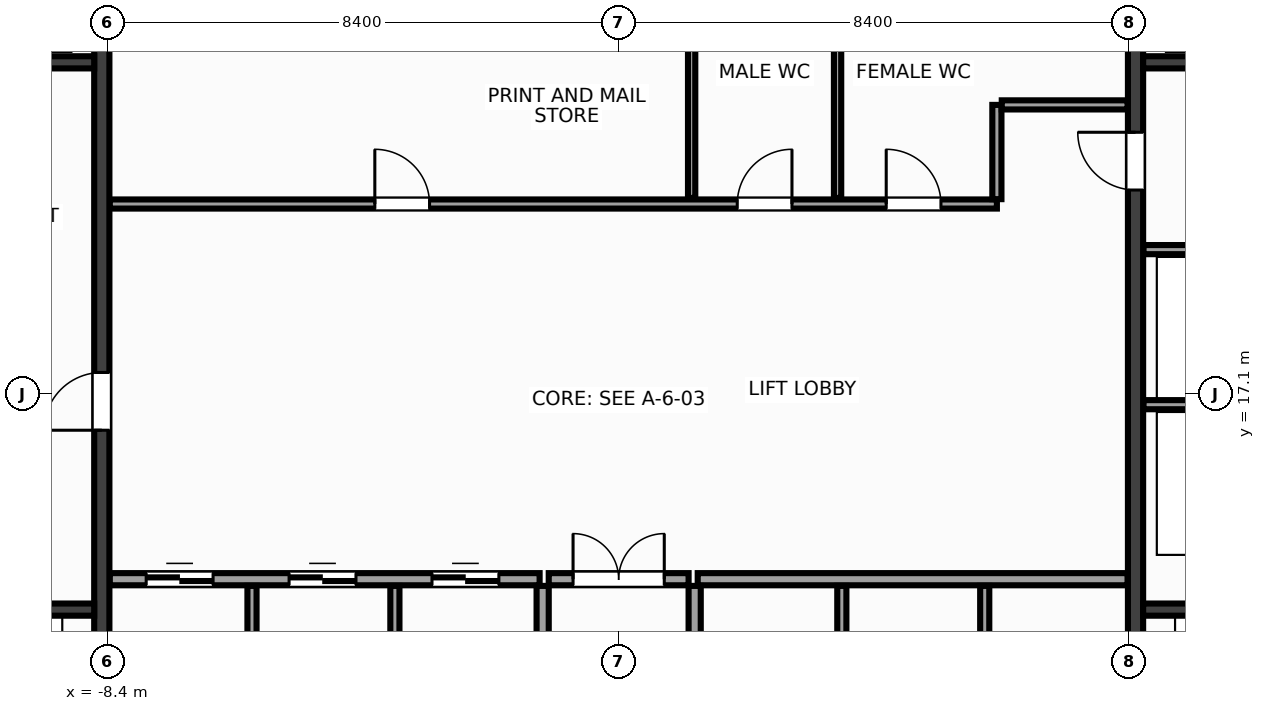
"""IFC4 building model, lengths in metres.
Left out: names, types, materials, properties, quantities, classifications, styles, units other than length and angle.
Written with IfcOpenShell. Run it as: python <this file> out.ifc"""

import sys

from ifc_helpers import new_model, si_unit, direction, frame, frame_2d, origin, place, context, subcontext, project, spatial, rectangle, extrude, source, transform, mapped, element, fill, save


model = new_model("IFC4")
c1 = context("Model", 3, precision=1e-05, world=origin(), true_north=direction((0.0, 1.0)))
c2 = subcontext(c1, "Body", "Model", "MODEL_VIEW")
j1 = project(units=[si_unit("LENGTHUNIT", "METRE"), si_unit("PLANEANGLEUNIT", "RADIAN")], contexts=[c1])
p1 = place(None, origin())
s1 = spatial("IfcSite", under=j1, at=p1, CompositionType="ELEMENT")
p2 = place(p1, origin())
s2 = spatial("IfcBuilding", under=s1, at=p2, CompositionType="ELEMENT")
p3 = place(p2, frame((0.0, 0.0, 52.4)))
s3 = spatial("IfcBuildingStorey", under=s2, at=p3, CompositionType="ELEMENT", Elevation=52.4)
m1 = source(origin(), c2, "Body", "SweptSolid", [
    extrude(rectangle(XDim=12.8, YDim=0.25, at=frame_2d((6.4, 0.0))), origin(), (0.0, 0.0, 1.0), 3.6),
])
p4 = place(p3, frame((-8.5, 10.6, 0.0), z_axis=(0.0, 0.0, 1.0), x_axis=(0.0, 1.0, 0.0)))
e1 = element("IfcWall", 1, at=p4, inside=s3, PredefinedType="SHEAR", context=c2, shape_type="MappedRepresentation", body=[
    mapped(m1, transform((0.0, 0.0, 0.0), x_axis=(1.0, 0.0, 0.0), y_axis=(0.0, 1.0, 0.0), z_axis=(0.0, 0.0, 1.0), scale=1.0)),
])
p5 = place(p4, frame((5.9, 0.0, 0.0)))
e2 = element("IfcOpeningElement", 2, at=p5, cuts=e1, PredefinedType="OPENING", context=c2, shape_type="SweptSolid", body=[
    extrude(rectangle(XDim=0.95, YDim=2.15, at=frame_2d((0.475, 1.075))), frame((0.0, 0.137, 0.0), z_axis=(0.0, -1.0, 0.0), x_axis=(1.0, 0.0, 0.0)), (0.0, 0.0, 1.0), 0.274),
])
p6 = place(p3, frame((8.5, 10.6, 0.0), z_axis=(0.0, 0.0, 1.0), x_axis=(0.0, 1.0, 0.0)))
e3 = element("IfcWall", 3, at=p6, inside=s3, PredefinedType="SHEAR", context=c2, shape_type="MappedRepresentation", body=[
    mapped(m1, transform((0.0, 0.0, 0.0), x_axis=(1.0, 0.0, 0.0), y_axis=(0.0, 1.0, 0.0), z_axis=(0.0, 0.0, 1.0), scale=1.0)),
])
p7 = place(p6, frame((9.85, 0.0, 0.0)))
e4 = element("IfcOpeningElement", 4, at=p7, cuts=e3, PredefinedType="OPENING", context=c2, shape_type="SweptSolid", body=[
    extrude(rectangle(XDim=0.95, YDim=2.15, at=frame_2d((0.475, 1.075))), frame((0.0, 0.137, 0.0), z_axis=(0.0, -1.0, 0.0), x_axis=(1.0, 0.0, 0.0)), (0.0, 0.0, 1.0), 0.274),
])
m2 = source(origin(), c2, "Body", "SweptSolid", [
    extrude(rectangle(XDim=2.825, YDim=0.2, at=frame_2d((1.413, 0.0))), origin(), (0.0, 0.0, 1.0), 3.6),
])
for number, where, z_axis, x_axis in (
    (5, (-11.45, 13.55, 0.0), (0.0, 0.0, 1.0), (1.0, 0.0, 0.0)),
    (6, (8.625, 13.55, 0.0), (0.0, 0.0, 1.0), (1.0, 0.0, 0.0)),
):
    element("IfcWall", number, at=place(p3, frame(where, z_axis=z_axis, x_axis=x_axis)), inside=s3, PredefinedType="SHEAR", context=c2, shape_type="MappedRepresentation", body=[
        mapped(m2, transform((0.0, 0.0, 0.0), x_axis=(1.0, 0.0, 0.0), y_axis=(0.0, 1.0, 0.0), z_axis=(0.0, 0.0, 1.0), scale=1.0)),
    ])
m3 = source(origin(), c2, "Body", "SweptSolid", [
    extrude(rectangle(XDim=3.02, YDim=0.2, at=frame_2d((1.51, 0.0))), origin(), (0.0, 0.0, 1.0), 3.6),
])
for number, where, z_axis, x_axis in (
    (7, (-11.645, 22.55, 0.0), (0.0, 0.0, 1.0), (1.0, 0.0, 0.0)),
    (8, (8.625, 22.55, 0.0), (0.0, 0.0, 1.0), (1.0, 0.0, 0.0)),
):
    element("IfcWall", number, at=place(p3, frame(where, z_axis=z_axis, x_axis=x_axis)), inside=s3, PredefinedType="SHEAR", context=c2, shape_type="MappedRepresentation", body=[
        mapped(m3, transform((0.0, 0.0, 0.0), x_axis=(1.0, 0.0, 0.0), y_axis=(0.0, 1.0, 0.0), z_axis=(0.0, 0.0, 1.0), scale=1.0)),
    ])
m4 = source(origin(), c2, "Body", "SweptSolid", [
    extrude(rectangle(XDim=3.01, YDim=0.15, at=frame_2d((1.505, 0.0))), origin(), (0.0, 0.0, 1.0), 3.36),
])
for number, where, z_axis, x_axis in (
    (9, (8.63, 16.92, 0.0), (0.0, 0.0, 1.0), (1.0, 0.0, 0.0)),
    (10, (8.63, 19.47, 0.0), (0.0, 0.0, 1.0), (1.0, 0.0, 0.0)),
):
    element("IfcWall", number, at=place(p3, frame(where, z_axis=z_axis, x_axis=x_axis)), inside=s3, PredefinedType="PARTITIONING", context=c2, shape_type="MappedRepresentation", body=[
        mapped(m4, transform((0.0, 0.0, 0.0), x_axis=(1.0, 0.0, 0.0), y_axis=(0.0, 1.0, 0.0), z_axis=(0.0, 0.0, 1.0), scale=1.0)),
    ])
m5 = source(origin(), c2, "Body", "SweptSolid", [
    extrude(rectangle(XDim=7.07, YDim=0.2, at=frame_2d((3.535, 0.0))), origin(), (0.0, 0.0, 1.0), 3.36),
])
p8 = place(p3, frame((-8.37, 14.05, 0.0), z_axis=(0.0, 0.0, 1.0), x_axis=(1.0, 0.0, 0.0)))
e11 = element("IfcWall", 11, at=p8, inside=s3, PredefinedType="PARTITIONING", context=c2, shape_type="MappedRepresentation", body=[
    mapped(m5, transform((0.0, 0.0, 0.0), x_axis=(1.0, 0.0, 0.0), y_axis=(0.0, 1.0, 0.0), z_axis=(0.0, 0.0, 1.0), scale=1.0)),
])
p9 = place(p8, frame((0.6, 0.0, 0.0)))
e12 = element("IfcOpeningElement", 12, at=p9, cuts=e11, PredefinedType="OPENING", context=c2, shape_type="SweptSolid", body=[
    extrude(rectangle(XDim=1.1, YDim=2.15, at=frame_2d((0.55, 1.075))), frame((0.0, 0.112, 0.0), z_axis=(0.0, -1.0, 0.0), x_axis=(1.0, 0.0, 0.0)), (0.0, 0.0, 1.0), 0.224),
])
p10 = place(p8, frame((2.95, 0.0, 0.0)))
e13 = element("IfcOpeningElement", 13, at=p10, cuts=e11, PredefinedType="OPENING", context=c2, shape_type="SweptSolid", body=[
    extrude(rectangle(XDim=1.1, YDim=2.15, at=frame_2d((0.55, 1.075))), frame((0.0, 0.112, 0.0), z_axis=(0.0, -1.0, 0.0), x_axis=(1.0, 0.0, 0.0)), (0.0, 0.0, 1.0), 0.224),
])
p11 = place(p8, frame((5.3, 0.0, 0.0)))
e14 = element("IfcOpeningElement", 14, at=p11, cuts=e11, PredefinedType="OPENING", context=c2, shape_type="SweptSolid", body=[
    extrude(rectangle(XDim=1.1, YDim=2.15, at=frame_2d((0.55, 1.075))), frame((0.0, 0.112, 0.0), z_axis=(0.0, -1.0, 0.0), x_axis=(1.0, 0.0, 0.0)), (0.0, 0.0, 1.0), 0.224),
])
p12 = place(p3, frame((1.3, 14.05, 0.0), z_axis=(0.0, 0.0, 1.0), x_axis=(1.0, 0.0, 0.0)))
e15 = element("IfcWall", 15, at=p12, inside=s3, PredefinedType="PARTITIONING", context=c2, shape_type="MappedRepresentation", body=[
    mapped(m5, transform((0.0, 0.0, 0.0), x_axis=(1.0, 0.0, 0.0), y_axis=(0.0, 1.0, 0.0), z_axis=(0.0, 0.0, 1.0), scale=1.0)),
])
m6 = source(origin(), c2, "Body", "SweptSolid", [
    extrude(rectangle(XDim=3.34, YDim=0.2, at=frame_2d((1.67, 0.0))), origin(), (0.0, 0.0, 1.0), 3.36),
])
for number, where, z_axis, x_axis in (
    (16, (-1.25, 10.6, 0.0), (0.0, 0.0, 1.0), (0.0, 1.0, 0.0)),
    (17, (1.25, 10.6, 0.0), (0.0, 0.0, 1.0), (0.0, 1.0, 0.0)),
):
    element("IfcWall", number, at=place(p3, frame(where, z_axis=z_axis, x_axis=x_axis)), inside=s3, PredefinedType="PARTITIONING", context=c2, shape_type="MappedRepresentation", body=[
        mapped(m6, transform((0.0, 0.0, 0.0), x_axis=(1.0, 0.0, 0.0), y_axis=(0.0, 1.0, 0.0), z_axis=(0.0, 0.0, 1.0), scale=1.0)),
    ])
m7 = source(origin(), c2, "Body", "SweptSolid", [
    extrude(rectangle(XDim=2.3, YDim=0.2, at=frame_2d((1.15, 0.0))), origin(), (0.0, 0.0, 1.0), 3.36),
])
p13 = place(p3, frame((-1.15, 14.05, 0.0), z_axis=(0.0, 0.0, 1.0), x_axis=(1.0, 0.0, 0.0)))
e18 = element("IfcWall", 18, at=p13, inside=s3, PredefinedType="PARTITIONING", context=c2, shape_type="MappedRepresentation", body=[
    mapped(m7, transform((0.0, 0.0, 0.0), x_axis=(1.0, 0.0, 0.0), y_axis=(0.0, 1.0, 0.0), z_axis=(0.0, 0.0, 1.0), scale=1.0)),
])
p14 = place(p13, frame((0.4, 0.0, 0.0)))
e19 = element("IfcOpeningElement", 19, at=p14, cuts=e18, PredefinedType="OPENING", context=c2, shape_type="SweptSolid", body=[
    extrude(rectangle(XDim=1.5, YDim=2.2, at=frame_2d((0.75, 1.1))), frame((0.0, 0.112, 0.0), z_axis=(0.0, -1.0, 0.0), x_axis=(1.0, 0.0, 0.0)), (0.0, 0.0, 1.0), 0.224),
])
m8 = source(origin(), c2, "Body", "SweptSolid", [
    extrude(rectangle(XDim=14.59, YDim=0.15, at=frame_2d((7.295, 0.0))), origin(), (0.0, 0.0, 1.0), 3.36),
])
p15 = place(p3, frame((-8.37, 20.22, 0.0), z_axis=(0.0, 0.0, 1.0), x_axis=(1.0, 0.0, 0.0)))
e20 = element("IfcWall", 20, at=p15, inside=s3, PredefinedType="PARTITIONING", context=c2, shape_type="MappedRepresentation", body=[
    mapped(m8, transform((0.0, 0.0, 0.0), x_axis=(1.0, 0.0, 0.0), y_axis=(0.0, 1.0, 0.0), z_axis=(0.0, 0.0, 1.0), scale=1.0)),
])
p16 = place(p15, frame((4.36, 0.0, 0.0)))
e21 = element("IfcOpeningElement", 21, at=p16, cuts=e20, PredefinedType="OPENING", context=c2, shape_type="SweptSolid", body=[
    extrude(rectangle(XDim=0.9, YDim=2.15, at=frame_2d((0.45, 1.075))), frame((0.0, 0.087, 0.0), z_axis=(0.0, -1.0, 0.0), x_axis=(1.0, 0.0, 0.0)), (0.0, 0.0, 1.0), 0.174),
])
p17 = place(p15, frame((10.32, 0.0, 0.0)))
e22 = element("IfcOpeningElement", 22, at=p17, cuts=e20, PredefinedType="OPENING", context=c2, shape_type="SweptSolid", body=[
    extrude(rectangle(XDim=0.9, YDim=2.15, at=frame_2d((0.45, 1.075))), frame((0.0, 0.087, 0.0), z_axis=(0.0, -1.0, 0.0), x_axis=(1.0, 0.0, 0.0)), (0.0, 0.0, 1.0), 0.174),
])
p18 = place(p15, frame((12.77, 0.0, 0.0)))
e23 = element("IfcOpeningElement", 23, at=p18, cuts=e20, PredefinedType="OPENING", context=c2, shape_type="SweptSolid", body=[
    extrude(rectangle(XDim=0.9, YDim=2.15, at=frame_2d((0.45, 1.075))), frame((0.0, 0.087, 0.0), z_axis=(0.0, -1.0, 0.0), x_axis=(1.0, 0.0, 0.0)), (0.0, 0.0, 1.0), 0.174),
])
m9 = source(origin(), c2, "Body", "SweptSolid", [
    extrude(rectangle(XDim=1.55, YDim=0.15, at=frame_2d((0.775, 0.0))), origin(), (0.0, 0.0, 1.0), 3.36),
])
p19 = place(p3, frame((6.22, 20.3, 0.0), z_axis=(0.0, 0.0, 1.0), x_axis=(0.0, 1.0, 0.0)))
e24 = element("IfcWall", 24, at=p19, inside=s3, PredefinedType="PARTITIONING", context=c2, shape_type="MappedRepresentation", body=[
    mapped(m9, transform((0.0, 0.0, 0.0), x_axis=(1.0, 0.0, 0.0), y_axis=(0.0, 1.0, 0.0), z_axis=(0.0, 0.0, 1.0), scale=1.0)),
])
m10 = source(origin(), c2, "Body", "SweptSolid", [
    extrude(rectangle(XDim=2.07, YDim=0.15, at=frame_2d((1.035, 0.0))), origin(), (0.0, 0.0, 1.0), 3.36),
])
p20 = place(p3, frame((6.3, 21.85, 0.0), z_axis=(0.0, 0.0, 1.0), x_axis=(1.0, 0.0, 0.0)))
e25 = element("IfcWall", 25, at=p20, inside=s3, PredefinedType="PARTITIONING", context=c2, shape_type="MappedRepresentation", body=[
    mapped(m10, transform((0.0, 0.0, 0.0), x_axis=(1.0, 0.0, 0.0), y_axis=(0.0, 1.0, 0.0), z_axis=(0.0, 0.0, 1.0), scale=1.0)),
])
m11 = source(origin(), c2, "Body", "SweptSolid", [
    extrude(rectangle(XDim=3.34, YDim=0.15, at=frame_2d((1.67, 0.0))), origin(), (0.0, 0.0, 1.0), 3.36),
])
for number, where, z_axis, x_axis in (
    (26, (-6.03, 10.6, 0.0), (0.0, 0.0, 1.0), (0.0, 1.0, 0.0)),
    (27, (-3.68, 10.6, 0.0), (0.0, 0.0, 1.0), (0.0, 1.0, 0.0)),
    (28, (3.67, 10.6, 0.0), (0.0, 0.0, 1.0), (0.0, 1.0, 0.0)),
    (29, (6.02, 10.6, 0.0), (0.0, 0.0, 1.0), (0.0, 1.0, 0.0)),
):
    element("IfcWall", number, at=place(p3, frame(where, z_axis=z_axis, x_axis=x_axis)), inside=s3, PredefinedType="PARTITIONING", context=c2, shape_type="MappedRepresentation", body=[
        mapped(m11, transform((0.0, 0.0, 0.0), x_axis=(1.0, 0.0, 0.0), y_axis=(0.0, 1.0, 0.0), z_axis=(0.0, 0.0, 1.0), scale=1.0)),
    ])
m12 = source(origin(), c2, "Body", "SweptSolid", [
    extrude(rectangle(XDim=3.04, YDim=0.12, at=frame_2d((1.52, 0.0))), origin(), (0.0, 0.0, 1.0), 3.36),
])
for number, where, z_axis, x_axis in (
    (30, (1.2, 20.32, 0.0), (0.0, 0.0, 1.0), (0.0, 1.0, 0.0)),
    (31, (3.6, 20.32, 0.0), (0.0, 0.0, 1.0), (0.0, 1.0, 0.0)),
):
    element("IfcWall", number, at=place(p3, frame(where, z_axis=z_axis, x_axis=x_axis)), inside=s3, PredefinedType="PARTITIONING", context=c2, shape_type="MappedRepresentation", body=[
        mapped(m12, transform((0.0, 0.0, 0.0), x_axis=(1.0, 0.0, 0.0), y_axis=(0.0, 1.0, 0.0), z_axis=(0.0, 0.0, 1.0), scale=1.0)),
    ])
m13 = source(origin(), c2, "Body", "SweptSolid", [
    extrude(rectangle(XDim=0.95, YDim=2.15, at=frame_2d((0.475, 1.075))), frame((0.0, 0.025, 0.0), z_axis=(0.0, -1.0, 0.0), x_axis=(1.0, 0.0, 0.0)), (0.0, 0.0, 1.0), 0.05),
])
p21 = place(p5, origin())
e32 = element("IfcDoor", 32, at=p21, inside=s3, OperationType="SINGLE_SWING_LEFT", PredefinedType="DOOR", context=c2, shape_type="MappedRepresentation", body=[
    mapped(m13, transform((0.0, 0.0, 0.0), x_axis=(1.0, 0.0, 0.0), y_axis=(0.0, 1.0, 0.0), z_axis=(0.0, 0.0, 1.0), scale=1.0)),
])
fill(e2, e32)
m14 = source(origin(), c2, "Body", "SweptSolid", [
    extrude(rectangle(XDim=0.95, YDim=2.15, at=frame_2d((0.475, 1.075))), frame((0.0, 0.025, 0.0), z_axis=(0.0, -1.0, 0.0), x_axis=(1.0, 0.0, 0.0)), (0.0, 0.0, 1.0), 0.05),
])
p22 = place(p7, origin())
e33 = element("IfcDoor", 33, at=p22, inside=s3, OperationType="SINGLE_SWING_RIGHT", PredefinedType="DOOR", context=c2, shape_type="MappedRepresentation", body=[
    mapped(m14, transform((0.0, 0.0, 0.0), x_axis=(1.0, 0.0, 0.0), y_axis=(0.0, 1.0, 0.0), z_axis=(0.0, 0.0, 1.0), scale=1.0)),
])
fill(e4, e33)
m15 = source(origin(), c2, "Body", "SweptSolid", [
    extrude(rectangle(XDim=1.1, YDim=2.15, at=frame_2d((0.55, 1.075))), frame((0.0, 0.025, 0.0), z_axis=(0.0, -1.0, 0.0), x_axis=(1.0, 0.0, 0.0)), (0.0, 0.0, 1.0), 0.05),
])
p23 = place(p9, origin())
e34 = element("IfcDoor", 34, at=p23, inside=s3, OperationType="DOUBLE_DOOR_SLIDING", PredefinedType="DOOR", context=c2, shape_type="MappedRepresentation", body=[
    mapped(m15, transform((0.0, 0.0, 0.0), x_axis=(1.0, 0.0, 0.0), y_axis=(0.0, 1.0, 0.0), z_axis=(0.0, 0.0, 1.0), scale=1.0)),
])
fill(e12, e34)
p24 = place(p10, origin())
e35 = element("IfcDoor", 35, at=p24, inside=s3, OperationType="DOUBLE_DOOR_SLIDING", PredefinedType="DOOR", context=c2, shape_type="MappedRepresentation", body=[
    mapped(m15, transform((0.0, 0.0, 0.0), x_axis=(1.0, 0.0, 0.0), y_axis=(0.0, 1.0, 0.0), z_axis=(0.0, 0.0, 1.0), scale=1.0)),
])
fill(e13, e35)
p25 = place(p11, origin())
e36 = element("IfcDoor", 36, at=p25, inside=s3, OperationType="DOUBLE_DOOR_SLIDING", PredefinedType="DOOR", context=c2, shape_type="MappedRepresentation", body=[
    mapped(m15, transform((0.0, 0.0, 0.0), x_axis=(1.0, 0.0, 0.0), y_axis=(0.0, 1.0, 0.0), z_axis=(0.0, 0.0, 1.0), scale=1.0)),
])
fill(e14, e36)
m16 = source(origin(), c2, "Body", "SweptSolid", [
    extrude(rectangle(XDim=1.5, YDim=2.2, at=frame_2d((0.75, 1.1))), frame((0.0, 0.025, 0.0), z_axis=(0.0, -1.0, 0.0), x_axis=(1.0, 0.0, 0.0)), (0.0, 0.0, 1.0), 0.05),
])
p26 = place(p14, origin())
e37 = element("IfcDoor", 37, at=p26, inside=s3, OperationType="DOUBLE_DOOR_SINGLE_SWING", PredefinedType="DOOR", context=c2, shape_type="MappedRepresentation", body=[
    mapped(m16, transform((0.0, 0.0, 0.0), x_axis=(1.0, 0.0, 0.0), y_axis=(0.0, 1.0, 0.0), z_axis=(0.0, 0.0, 1.0), scale=1.0)),
])
fill(e19, e37)
m17 = source(origin(), c2, "Body", "SweptSolid", [
    extrude(rectangle(XDim=0.9, YDim=2.15, at=frame_2d((0.45, 1.075))), frame((0.0, 0.025, 0.0), z_axis=(0.0, -1.0, 0.0), x_axis=(1.0, 0.0, 0.0)), (0.0, 0.0, 1.0), 0.05),
])
p27 = place(p16, origin())
e38 = element("IfcDoor", 38, at=p27, inside=s3, OperationType="SINGLE_SWING_LEFT", PredefinedType="DOOR", context=c2, shape_type="MappedRepresentation", body=[
    mapped(m17, transform((0.0, 0.0, 0.0), x_axis=(1.0, 0.0, 0.0), y_axis=(0.0, 1.0, 0.0), z_axis=(0.0, 0.0, 1.0), scale=1.0)),
])
fill(e21, e38)
p28 = place(p17, origin())
e39 = element("IfcDoor", 39, at=p28, inside=s3, OperationType="SINGLE_SWING_RIGHT", PredefinedType="DOOR", context=c2, shape_type="MappedRepresentation", body=[
    mapped(m17, transform((0.0, 0.0, 0.0), x_axis=(1.0, 0.0, 0.0), y_axis=(0.0, 1.0, 0.0), z_axis=(0.0, 0.0, 1.0), scale=1.0)),
])
fill(e22, e39)
p29 = place(p18, origin())
e40 = element("IfcDoor", 40, at=p29, inside=s3, OperationType="SINGLE_SWING_LEFT", PredefinedType="DOOR", context=c2, shape_type="MappedRepresentation", body=[
    mapped(m17, transform((0.0, 0.0, 0.0), x_axis=(1.0, 0.0, 0.0), y_axis=(0.0, 1.0, 0.0), z_axis=(0.0, 0.0, 1.0), scale=1.0)),
])
fill(e23, e40)
save(model, sys.argv[1])
